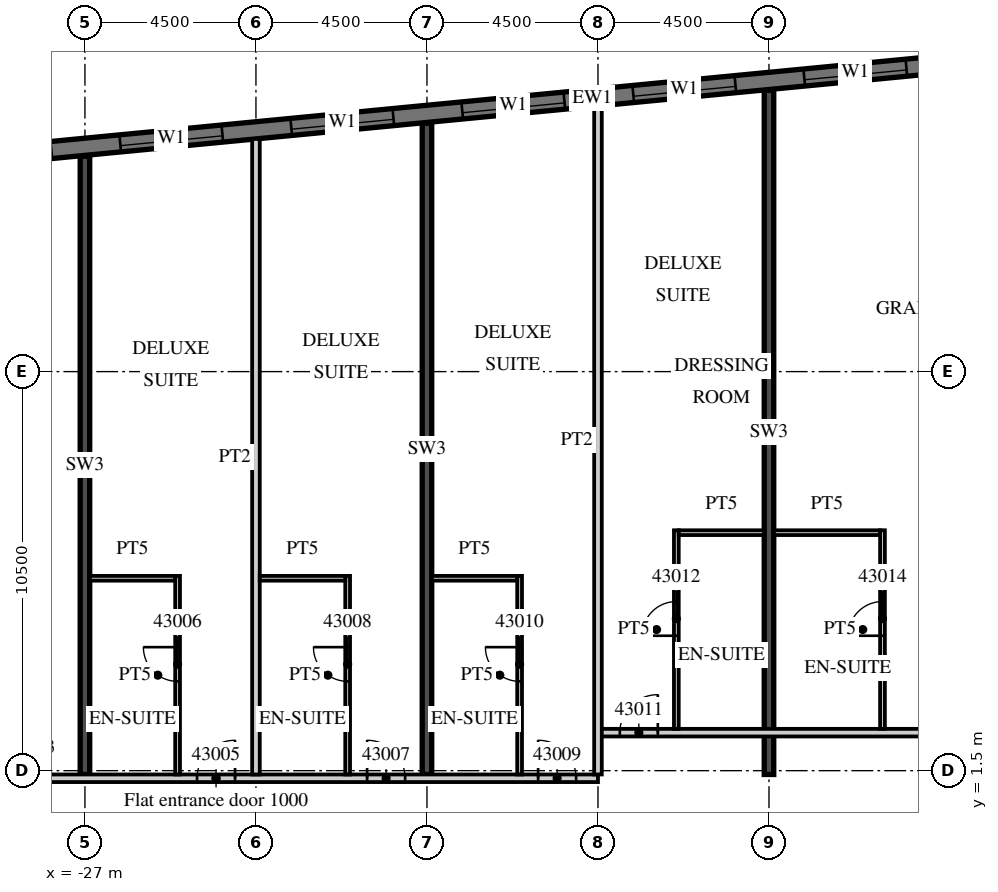
"""IFC4 building model, lengths in metres.
Left out: names, types, materials, properties, quantities, classifications, styles, units other than length and angle.
Written with IfcOpenShell. Run it as: python <this file> out.ifc"""

import sys

from ifc_helpers import new_model, si_unit, direction, frame, frame_2d, origin, place, context, subcontext, project, spatial, rectangle, extrude, element, fill, save


model = new_model("IFC4")
c1 = context("Model", 3, precision=1e-05, world=origin(), true_north=direction((0.0, 1.0)))
c2 = subcontext(c1, "Body", "Model", "MODEL_VIEW")
j1 = project(units=[si_unit("LENGTHUNIT", "METRE"), si_unit("PLANEANGLEUNIT", "RADIAN")], contexts=[c1])
p1 = place(None, origin())
s1 = spatial("IfcSite", under=j1, at=p1, CompositionType="ELEMENT")
p2 = place(p1, origin())
s2 = spatial("IfcBuilding", under=s1, at=p2, CompositionType="ELEMENT")
p3 = place(p2, frame((0.0, 0.0, 183.4)))
s3 = spatial("IfcBuildingStorey", under=s2, at=p3, CompositionType="ELEMENT", Elevation=183.4)
p4 = place(p3, frame((-27.0, 1.4, 0.0), z_axis=(0.0, 0.0, 1.0), x_axis=(0.0, 1.0, 0.0)))
e1 = element("IfcWall", 1, at=p4, inside=s3, PredefinedType="SHEAR", context=c2, shape_type="SweptSolid", body=[
    extrude(rectangle(XDim=16.268, YDim=0.25, at=frame_2d((8.134, 0.0))), origin(), (0.0, 0.0, 1.0), 3.3),
])
p5 = place(p3, frame((-18.0, 1.4, 0.0), z_axis=(0.0, 0.0, 1.0), x_axis=(0.0, 1.0, 0.0)))
e2 = element("IfcWall", 2, at=p5, inside=s3, PredefinedType="SHEAR", context=c2, shape_type="SweptSolid", body=[
    extrude(rectangle(XDim=17.134, YDim=0.25, at=frame_2d((8.567, 0.0))), origin(), (0.0, 0.0, 1.0), 3.3),
])
p6 = place(p3, frame((-9.0, 1.4, 0.0), z_axis=(0.0, 0.0, 1.0), x_axis=(0.0, 1.0, 0.0)))
e3 = element("IfcWall", 3, at=p6, inside=s3, PredefinedType="SHEAR", context=c2, shape_type="SweptSolid", body=[
    extrude(rectangle(XDim=18.001, YDim=0.25, at=frame_2d((9.0, 0.0))), origin(), (0.0, 0.0, 1.0), 3.3),
])
p7 = place(p3, frame((13.521, 21.817, 0.0), z_axis=(0.0, 0.0, 1.0), x_axis=(-0.995396508751, -0.095842529008, 0.0)))
e4 = element("IfcWall", 4, at=p7, inside=s3, PredefinedType="SOLIDWALL", context=c2, shape_type="SweptSolid", body=[
    extrude(rectangle(XDim=54.591, YDim=0.45, at=frame_2d((27.296, 0.0))), origin(), (0.0, 0.0, 1.0), 3.02),
])
p8 = place(p7, frame((0.91, 0.0, 0.45)))
e5 = element("IfcOpeningElement", 5, at=p8, cuts=e4, PredefinedType="OPENING", context=c2, shape_type="SweptSolid", body=[
    extrude(rectangle(XDim=2.7, YDim=2.25, at=frame_2d((1.35, 1.125))), frame((0.0, 0.235, 0.0), z_axis=(0.0, -1.0, 0.0), x_axis=(1.0, 0.0, 0.0)), (0.0, 0.0, 1.0), 0.47),
])
p9 = place(p7, frame((5.431, 0.0, 0.45)))
e6 = element("IfcOpeningElement", 6, at=p9, cuts=e4, PredefinedType="OPENING", context=c2, shape_type="SweptSolid", body=[
    extrude(rectangle(XDim=2.7, YDim=2.25, at=frame_2d((1.35, 1.125))), frame((0.0, 0.235, 0.0), z_axis=(0.0, -1.0, 0.0), x_axis=(1.0, 0.0, 0.0)), (0.0, 0.0, 1.0), 0.47),
])
p10 = place(p7, frame((9.952, 0.0, 0.45)))
e7 = element("IfcOpeningElement", 7, at=p10, cuts=e4, PredefinedType="OPENING", context=c2, shape_type="SweptSolid", body=[
    extrude(rectangle(XDim=2.7, YDim=2.25, at=frame_2d((1.35, 1.125))), frame((0.0, 0.235, 0.0), z_axis=(0.0, -1.0, 0.0), x_axis=(1.0, 0.0, 0.0)), (0.0, 0.0, 1.0), 0.47),
])
p11 = place(p7, frame((14.473, 0.0, 0.45)))
e8 = element("IfcOpeningElement", 8, at=p11, cuts=e4, PredefinedType="OPENING", context=c2, shape_type="SweptSolid", body=[
    extrude(rectangle(XDim=2.7, YDim=2.25, at=frame_2d((1.35, 1.125))), frame((0.0, 0.235, 0.0), z_axis=(0.0, -1.0, 0.0), x_axis=(1.0, 0.0, 0.0)), (0.0, 0.0, 1.0), 0.47),
])
p12 = place(p7, frame((18.994, 0.0, 0.45)))
e9 = element("IfcOpeningElement", 9, at=p12, cuts=e4, PredefinedType="OPENING", context=c2, shape_type="SweptSolid", body=[
    extrude(rectangle(XDim=2.7, YDim=2.25, at=frame_2d((1.35, 1.125))), frame((0.0, 0.235, 0.0), z_axis=(0.0, -1.0, 0.0), x_axis=(1.0, 0.0, 0.0)), (0.0, 0.0, 1.0), 0.47),
])
p13 = place(p7, frame((23.514, 0.0, 0.45)))
e10 = element("IfcOpeningElement", 10, at=p13, cuts=e4, PredefinedType="OPENING", context=c2, shape_type="SweptSolid", body=[
    extrude(rectangle(XDim=2.7, YDim=2.25, at=frame_2d((1.35, 1.125))), frame((0.0, 0.235, 0.0), z_axis=(0.0, -1.0, 0.0), x_axis=(1.0, 0.0, 0.0)), (0.0, 0.0, 1.0), 0.47),
])
p14 = place(p7, frame((28.035, 0.0, 0.45)))
e11 = element("IfcOpeningElement", 11, at=p14, cuts=e4, PredefinedType="OPENING", context=c2, shape_type="SweptSolid", body=[
    extrude(rectangle(XDim=2.7, YDim=2.25, at=frame_2d((1.35, 1.125))), frame((0.0, 0.235, 0.0), z_axis=(0.0, -1.0, 0.0), x_axis=(1.0, 0.0, 0.0)), (0.0, 0.0, 1.0), 0.47),
])
p15 = place(p7, frame((32.556, 0.0, 0.45)))
e12 = element("IfcOpeningElement", 12, at=p15, cuts=e4, PredefinedType="OPENING", context=c2, shape_type="SweptSolid", body=[
    extrude(rectangle(XDim=2.7, YDim=2.25, at=frame_2d((1.35, 1.125))), frame((0.0, 0.235, 0.0), z_axis=(0.0, -1.0, 0.0), x_axis=(1.0, 0.0, 0.0)), (0.0, 0.0, 1.0), 0.47),
])
p16 = place(p7, frame((37.077, 0.0, 0.45)))
e13 = element("IfcOpeningElement", 13, at=p16, cuts=e4, PredefinedType="OPENING", context=c2, shape_type="SweptSolid", body=[
    extrude(rectangle(XDim=2.7, YDim=2.25, at=frame_2d((1.35, 1.125))), frame((0.0, 0.235, 0.0), z_axis=(0.0, -1.0, 0.0), x_axis=(1.0, 0.0, 0.0)), (0.0, 0.0, 1.0), 0.47),
])
p17 = place(p7, frame((41.598, 0.0, 0.45)))
e14 = element("IfcOpeningElement", 14, at=p17, cuts=e4, PredefinedType="OPENING", context=c2, shape_type="SweptSolid", body=[
    extrude(rectangle(XDim=2.7, YDim=2.25, at=frame_2d((1.35, 1.125))), frame((0.0, 0.235, 0.0), z_axis=(0.0, -1.0, 0.0), x_axis=(1.0, 0.0, 0.0)), (0.0, 0.0, 1.0), 0.47),
])
p18 = place(p7, frame((46.118, 0.0, 0.45)))
e15 = element("IfcOpeningElement", 15, at=p18, cuts=e4, PredefinedType="OPENING", context=c2, shape_type="SweptSolid", body=[
    extrude(rectangle(XDim=2.7, YDim=2.25, at=frame_2d((1.35, 1.125))), frame((0.0, 0.235, 0.0), z_axis=(0.0, -1.0, 0.0), x_axis=(1.0, 0.0, 0.0)), (0.0, 0.0, 1.0), 0.47),
])
p19 = place(p7, frame((50.629, 0.0, 0.45)))
e16 = element("IfcOpeningElement", 16, at=p19, cuts=e4, PredefinedType="OPENING", context=c2, shape_type="SweptSolid", body=[
    extrude(rectangle(XDim=2.7, YDim=2.25, at=frame_2d((1.35, 1.125))), frame((0.0, 0.235, 0.0), z_axis=(0.0, -1.0, 0.0), x_axis=(1.0, 0.0, 0.0)), (0.0, 0.0, 1.0), 0.47),
])
p20 = place(p3, frame((-42.913, 1.3, 0.0), z_axis=(0.0, 0.0, 1.0), x_axis=(1.0, 0.0, 0.0)))
e17 = element("IfcWall", 17, at=p20, inside=s3, PredefinedType="PARTITIONING", context=c2, shape_type="SweptSolid", body=[
    extrude(rectangle(XDim=29.413, YDim=0.2, at=frame_2d((14.707, 0.0))), origin(), (0.0, 0.0, 1.0), 3.02),
])
p21 = place(p20, frame((1.406, 0.0, 0.0)))
e18 = element("IfcOpeningElement", 18, at=p21, cuts=e17, PredefinedType="OPENING", context=c2, shape_type="SweptSolid", body=[
    extrude(rectangle(XDim=1.2, YDim=2.1, at=frame_2d((0.6, 1.05))), frame((0.0, 0.11, 0.0), z_axis=(0.0, -1.0, 0.0), x_axis=(1.0, 0.0, 0.0)), (0.0, 0.0, 1.0), 0.22),
])
p22 = place(p20, frame((12.275, 0.0, 0.0)))
e19 = element("IfcOpeningElement", 19, at=p22, cuts=e17, PredefinedType="OPENING", context=c2, shape_type="SweptSolid", body=[
    extrude(rectangle(XDim=1.2, YDim=2.1, at=frame_2d((0.6, 1.05))), frame((0.0, 0.11, 0.0), z_axis=(0.0, -1.0, 0.0), x_axis=(1.0, 0.0, 0.0)), (0.0, 0.0, 1.0), 0.22),
])
p23 = place(p20, frame((18.863, 0.0, 0.0)))
e20 = element("IfcOpeningElement", 20, at=p23, cuts=e17, PredefinedType="OPENING", context=c2, shape_type="SweptSolid", body=[
    extrude(rectangle(XDim=1.0, YDim=2.1, at=frame_2d((0.5, 1.05))), frame((0.0, 0.11, 0.0), z_axis=(0.0, -1.0, 0.0), x_axis=(1.0, 0.0, 0.0)), (0.0, 0.0, 1.0), 0.22),
])
p24 = place(p20, frame((23.338, 0.0, 0.0)))
e21 = element("IfcOpeningElement", 21, at=p24, cuts=e17, PredefinedType="OPENING", context=c2, shape_type="SweptSolid", body=[
    extrude(rectangle(XDim=1.0, YDim=2.1, at=frame_2d((0.5, 1.05))), frame((0.0, 0.11, 0.0), z_axis=(0.0, -1.0, 0.0), x_axis=(1.0, 0.0, 0.0)), (0.0, 0.0, 1.0), 0.22),
])
p25 = place(p20, frame((27.838, 0.0, 0.0)))
e22 = element("IfcOpeningElement", 22, at=p25, cuts=e17, PredefinedType="OPENING", context=c2, shape_type="SweptSolid", body=[
    extrude(rectangle(XDim=1.0, YDim=2.1, at=frame_2d((0.5, 1.05))), frame((0.0, 0.11, 0.0), z_axis=(0.0, -1.0, 0.0), x_axis=(1.0, 0.0, 0.0)), (0.0, 0.0, 1.0), 0.22),
])
p26 = place(p3, frame((-13.5, 2.5, 0.0), z_axis=(0.0, 0.0, 1.0), x_axis=(1.0, 0.0, 0.0)))
e23 = element("IfcWall", 23, at=p26, inside=s3, PredefinedType="PARTITIONING", context=c2, shape_type="SweptSolid", body=[
    extrude(rectangle(XDim=27.0, YDim=0.2, at=frame_2d((13.5, 0.0))), origin(), (0.0, 0.0, 1.0), 3.02),
])
p27 = place(p26, frame((0.575, 0.0, 0.0)))
e24 = element("IfcOpeningElement", 24, at=p27, cuts=e23, PredefinedType="OPENING", context=c2, shape_type="SweptSolid", body=[
    extrude(rectangle(XDim=1.0, YDim=2.1, at=frame_2d((0.5, 1.05))), frame((0.0, 0.11, 0.0), z_axis=(0.0, -1.0, 0.0), x_axis=(1.0, 0.0, 0.0)), (0.0, 0.0, 1.0), 0.22),
])
p28 = place(p26, frame((9.863, 0.0, 0.0)))
e25 = element("IfcOpeningElement", 25, at=p28, cuts=e23, PredefinedType="OPENING", context=c2, shape_type="SweptSolid", body=[
    extrude(rectangle(XDim=1.2, YDim=2.1, at=frame_2d((0.6, 1.05))), frame((0.0, 0.11, 0.0), z_axis=(0.0, -1.0, 0.0), x_axis=(1.0, 0.0, 0.0)), (0.0, 0.0, 1.0), 0.22),
])
p29 = place(p26, frame((15.938, 0.0, 0.0)))
e26 = element("IfcOpeningElement", 26, at=p29, cuts=e23, PredefinedType="OPENING", context=c2, shape_type="SweptSolid", body=[
    extrude(rectangle(XDim=1.2, YDim=2.1, at=frame_2d((0.6, 1.05))), frame((0.0, 0.11, 0.0), z_axis=(0.0, -1.0, 0.0), x_axis=(1.0, 0.0, 0.0)), (0.0, 0.0, 1.0), 0.22),
])
p30 = place(p26, frame((25.425, 0.0, 0.0)))
e27 = element("IfcOpeningElement", 27, at=p30, cuts=e23, PredefinedType="OPENING", context=c2, shape_type="SweptSolid", body=[
    extrude(rectangle(XDim=1.0, YDim=2.1, at=frame_2d((0.5, 1.05))), frame((0.0, 0.11, 0.0), z_axis=(0.0, -1.0, 0.0), x_axis=(1.0, 0.0, 0.0)), (0.0, 0.0, 1.0), 0.22),
])
p31 = place(p3, frame((-22.5, 1.4, 0.0), z_axis=(0.0, 0.0, 1.0), x_axis=(0.0, 1.0, 0.0)))
e28 = element("IfcWall", 28, at=p31, inside=s3, PredefinedType="PARTITIONING", context=c2, shape_type="SweptSolid", body=[
    extrude(rectangle(XDim=16.723, YDim=0.2, at=frame_2d((8.362, 0.0))), origin(), (0.0, 0.0, 1.0), 3.02),
])
p32 = place(p3, frame((-24.562, 1.4, 0.0), z_axis=(0.0, 0.0, 1.0), x_axis=(0.0, 1.0, 0.0)))
e29 = element("IfcWall", 29, at=p32, inside=s3, PredefinedType="PARTITIONING", context=c2, shape_type="SweptSolid", body=[
    extrude(rectangle(XDim=5.225, YDim=0.125, at=frame_2d((2.613, 0.0))), origin(), (0.0, 0.0, 1.0), 3.02),
])
p33 = place(p32, frame((2.45, 0.0, 0.0)))
e30 = element("IfcOpeningElement", 30, at=p33, cuts=e29, PredefinedType="OPENING", context=c2, shape_type="SweptSolid", body=[
    extrude(rectangle(XDim=0.9, YDim=2.1, at=frame_2d((0.45, 1.05))), frame((0.0, 0.073, 0.0), z_axis=(0.0, -1.0, 0.0), x_axis=(1.0, 0.0, 0.0)), (0.0, 0.0, 1.0), 0.145),
])
p34 = place(p3, frame((-26.875, 6.562, 0.0), z_axis=(0.0, 0.0, 1.0), x_axis=(1.0, 0.0, 0.0)))
e31 = element("IfcWall", 31, at=p34, inside=s3, PredefinedType="PARTITIONING", context=c2, shape_type="SweptSolid", body=[
    extrude(rectangle(XDim=2.25, YDim=0.125, at=frame_2d((1.125, 0.0))), origin(), (0.0, 0.0, 1.0), 3.02),
])
p35 = place(p3, frame((-20.087, 1.4, 0.0), z_axis=(0.0, 0.0, 1.0), x_axis=(0.0, 1.0, 0.0)))
e32 = element("IfcWall", 32, at=p35, inside=s3, PredefinedType="PARTITIONING", context=c2, shape_type="SweptSolid", body=[
    extrude(rectangle(XDim=5.225, YDim=0.125, at=frame_2d((2.613, 0.0))), origin(), (0.0, 0.0, 1.0), 3.02),
])
p36 = place(p35, frame((2.45, 0.0, 0.0)))
e33 = element("IfcOpeningElement", 33, at=p36, cuts=e32, PredefinedType="OPENING", context=c2, shape_type="SweptSolid", body=[
    extrude(rectangle(XDim=0.9, YDim=2.1, at=frame_2d((0.45, 1.05))), frame((0.0, 0.073, 0.0), z_axis=(0.0, -1.0, 0.0), x_axis=(1.0, 0.0, 0.0)), (0.0, 0.0, 1.0), 0.145),
])
p37 = place(p3, frame((-22.4, 6.562, 0.0), z_axis=(0.0, 0.0, 1.0), x_axis=(1.0, 0.0, 0.0)))
e34 = element("IfcWall", 34, at=p37, inside=s3, PredefinedType="PARTITIONING", context=c2, shape_type="SweptSolid", body=[
    extrude(rectangle(XDim=2.25, YDim=0.125, at=frame_2d((1.125, 0.0))), origin(), (0.0, 0.0, 1.0), 3.02),
])
p38 = place(p3, frame((-13.5, 1.4, 0.0), z_axis=(0.0, 0.0, 1.0), x_axis=(0.0, 1.0, 0.0)))
e35 = element("IfcWall", 35, at=p38, inside=s3, PredefinedType="PARTITIONING", context=c2, shape_type="SweptSolid", body=[
    extrude(rectangle(XDim=17.59, YDim=0.2, at=frame_2d((8.795, 0.0))), origin(), (0.0, 0.0, 1.0), 3.02),
])
p39 = place(p3, frame((-15.562, 1.4, 0.0), z_axis=(0.0, 0.0, 1.0), x_axis=(0.0, 1.0, 0.0)))
e36 = element("IfcWall", 36, at=p39, inside=s3, PredefinedType="PARTITIONING", context=c2, shape_type="SweptSolid", body=[
    extrude(rectangle(XDim=5.225, YDim=0.125, at=frame_2d((2.613, 0.0))), origin(), (0.0, 0.0, 1.0), 3.02),
])
p40 = place(p39, frame((2.45, 0.0, 0.0)))
e37 = element("IfcOpeningElement", 37, at=p40, cuts=e36, PredefinedType="OPENING", context=c2, shape_type="SweptSolid", body=[
    extrude(rectangle(XDim=0.9, YDim=2.1, at=frame_2d((0.45, 1.05))), frame((0.0, 0.073, 0.0), z_axis=(0.0, -1.0, 0.0), x_axis=(1.0, 0.0, 0.0)), (0.0, 0.0, 1.0), 0.145),
])
p41 = place(p3, frame((-17.875, 6.562, 0.0), z_axis=(0.0, 0.0, 1.0), x_axis=(1.0, 0.0, 0.0)))
e38 = element("IfcWall", 38, at=p41, inside=s3, PredefinedType="PARTITIONING", context=c2, shape_type="SweptSolid", body=[
    extrude(rectangle(XDim=2.25, YDim=0.125, at=frame_2d((1.125, 0.0))), origin(), (0.0, 0.0, 1.0), 3.02),
])
p42 = place(p3, frame((-11.438, 2.6, 0.0), z_axis=(0.0, 0.0, 1.0), x_axis=(0.0, 1.0, 0.0)))
e39 = element("IfcWall", 39, at=p42, inside=s3, PredefinedType="PARTITIONING", context=c2, shape_type="SweptSolid", body=[
    extrude(rectangle(XDim=5.225, YDim=0.125, at=frame_2d((2.612, 0.0))), origin(), (0.0, 0.0, 1.0), 3.02),
])
p43 = place(p42, frame((2.45, 0.0, 0.0)))
e40 = element("IfcOpeningElement", 40, at=p43, cuts=e39, PredefinedType="OPENING", context=c2, shape_type="SweptSolid", body=[
    extrude(rectangle(XDim=0.9, YDim=2.1, at=frame_2d((0.45, 1.05))), frame((0.0, 0.073, 0.0), z_axis=(0.0, -1.0, 0.0), x_axis=(1.0, 0.0, 0.0)), (0.0, 0.0, 1.0), 0.145),
])
p44 = place(p3, frame((-11.375, 7.762, 0.0), z_axis=(0.0, 0.0, 1.0), x_axis=(1.0, 0.0, 0.0)))
e41 = element("IfcWall", 41, at=p44, inside=s3, PredefinedType="PARTITIONING", context=c2, shape_type="SweptSolid", body=[
    extrude(rectangle(XDim=2.25, YDim=0.125, at=frame_2d((1.125, 0.0))), origin(), (0.0, 0.0, 1.0), 3.02),
])
p45 = place(p3, frame((-6.013, 2.6, 0.0), z_axis=(0.0, 0.0, 1.0), x_axis=(0.0, 1.0, 0.0)))
e42 = element("IfcWall", 42, at=p45, inside=s3, PredefinedType="PARTITIONING", context=c2, shape_type="SweptSolid", body=[
    extrude(rectangle(XDim=5.225, YDim=0.125, at=frame_2d((2.612, 0.0))), origin(), (0.0, 0.0, 1.0), 3.02),
])
p46 = place(p45, frame((2.45, 0.0, 0.0)))
e43 = element("IfcOpeningElement", 43, at=p46, cuts=e42, PredefinedType="OPENING", context=c2, shape_type="SweptSolid", body=[
    extrude(rectangle(XDim=0.9, YDim=2.1, at=frame_2d((0.45, 1.05))), frame((0.0, 0.073, 0.0), z_axis=(0.0, -1.0, 0.0), x_axis=(1.0, 0.0, 0.0)), (0.0, 0.0, 1.0), 0.145),
])
p47 = place(p3, frame((-8.875, 7.762, 0.0), z_axis=(0.0, 0.0, 1.0), x_axis=(1.0, 0.0, 0.0)))
e44 = element("IfcWall", 44, at=p47, inside=s3, PredefinedType="PARTITIONING", context=c2, shape_type="SweptSolid", body=[
    extrude(rectangle(XDim=2.8, YDim=0.125, at=frame_2d((1.4, 0.0))), origin(), (0.0, 0.0, 1.0), 3.02),
])
p48 = place(p12, origin())
e45 = element("IfcWindow", 45, at=p48, inside=s3, PartitioningType="SINGLE_PANEL", PredefinedType="WINDOW", context=c2, shape_type="SweptSolid", body=[
    extrude(rectangle(XDim=2.7, YDim=2.25, at=frame_2d((1.35, 1.125))), frame((0.0, 0.09, 0.0), z_axis=(0.0, -1.0, 0.0), x_axis=(1.0, 0.0, 0.0)), (0.0, 0.0, 1.0), 0.06),
])
fill(e9, e45)
p49 = place(p13, origin())
e46 = element("IfcWindow", 46, at=p49, inside=s3, PartitioningType="SINGLE_PANEL", PredefinedType="WINDOW", context=c2, shape_type="SweptSolid", body=[
    extrude(rectangle(XDim=2.7, YDim=2.25, at=frame_2d((1.35, 1.125))), frame((0.0, 0.09, 0.0), z_axis=(0.0, -1.0, 0.0), x_axis=(1.0, 0.0, 0.0)), (0.0, 0.0, 1.0), 0.06),
])
fill(e10, e46)
p50 = place(p14, origin())
e47 = element("IfcWindow", 47, at=p50, inside=s3, PartitioningType="SINGLE_PANEL", PredefinedType="WINDOW", context=c2, shape_type="SweptSolid", body=[
    extrude(rectangle(XDim=2.7, YDim=2.25, at=frame_2d((1.35, 1.125))), frame((0.0, 0.09, 0.0), z_axis=(0.0, -1.0, 0.0), x_axis=(1.0, 0.0, 0.0)), (0.0, 0.0, 1.0), 0.06),
])
fill(e11, e47)
p51 = place(p15, origin())
e48 = element("IfcWindow", 48, at=p51, inside=s3, PartitioningType="SINGLE_PANEL", PredefinedType="WINDOW", context=c2, shape_type="SweptSolid", body=[
    extrude(rectangle(XDim=2.7, YDim=2.25, at=frame_2d((1.35, 1.125))), frame((0.0, 0.09, 0.0), z_axis=(0.0, -1.0, 0.0), x_axis=(1.0, 0.0, 0.0)), (0.0, 0.0, 1.0), 0.06),
])
fill(e12, e48)
p52 = place(p16, origin())
e49 = element("IfcWindow", 49, at=p52, inside=s3, PartitioningType="SINGLE_PANEL", PredefinedType="WINDOW", context=c2, shape_type="SweptSolid", body=[
    extrude(rectangle(XDim=2.7, YDim=2.25, at=frame_2d((1.35, 1.125))), frame((0.0, 0.09, 0.0), z_axis=(0.0, -1.0, 0.0), x_axis=(1.0, 0.0, 0.0)), (0.0, 0.0, 1.0), 0.06),
])
fill(e13, e49)
p53 = place(p23, origin())
e50 = element("IfcDoor", 50, at=p53, inside=s3, OperationType="SINGLE_SWING_RIGHT", PredefinedType="DOOR", context=c2, shape_type="SweptSolid", body=[
    extrude(rectangle(XDim=1.0, YDim=2.1, at=frame_2d((0.5, 1.05))), frame((0.0, 0.025, 0.0), z_axis=(0.0, -1.0, 0.0), x_axis=(1.0, 0.0, 0.0)), (0.0, 0.0, 1.0), 0.05),
])
fill(e20, e50)
p54 = place(p33, origin())
e51 = element("IfcDoor", 51, at=p54, inside=s3, OperationType="SINGLE_SWING_RIGHT", PredefinedType="DOOR", context=c2, shape_type="SweptSolid", body=[
    extrude(rectangle(XDim=0.9, YDim=2.1, at=frame_2d((0.45, 1.05))), frame((0.0, 0.025, 0.0), z_axis=(0.0, -1.0, 0.0), x_axis=(1.0, 0.0, 0.0)), (0.0, 0.0, 1.0), 0.05),
])
fill(e30, e51)
p55 = place(p24, origin())
e52 = element("IfcDoor", 52, at=p55, inside=s3, OperationType="SINGLE_SWING_LEFT", PredefinedType="DOOR", context=c2, shape_type="SweptSolid", body=[
    extrude(rectangle(XDim=1.0, YDim=2.1, at=frame_2d((0.5, 1.05))), frame((0.0, 0.025, 0.0), z_axis=(0.0, -1.0, 0.0), x_axis=(1.0, 0.0, 0.0)), (0.0, 0.0, 1.0), 0.05),
])
fill(e21, e52)
p56 = place(p36, origin())
e53 = element("IfcDoor", 53, at=p56, inside=s3, OperationType="SINGLE_SWING_RIGHT", PredefinedType="DOOR", context=c2, shape_type="SweptSolid", body=[
    extrude(rectangle(XDim=0.9, YDim=2.1, at=frame_2d((0.45, 1.05))), frame((0.0, 0.025, 0.0), z_axis=(0.0, -1.0, 0.0), x_axis=(1.0, 0.0, 0.0)), (0.0, 0.0, 1.0), 0.05),
])
fill(e33, e53)
p57 = place(p25, origin())
e54 = element("IfcDoor", 54, at=p57, inside=s3, OperationType="SINGLE_SWING_LEFT", PredefinedType="DOOR", context=c2, shape_type="SweptSolid", body=[
    extrude(rectangle(XDim=1.0, YDim=2.1, at=frame_2d((0.5, 1.05))), frame((0.0, 0.025, 0.0), z_axis=(0.0, -1.0, 0.0), x_axis=(1.0, 0.0, 0.0)), (0.0, 0.0, 1.0), 0.05),
])
fill(e22, e54)
p58 = place(p40, origin())
e55 = element("IfcDoor", 55, at=p58, inside=s3, OperationType="SINGLE_SWING_RIGHT", PredefinedType="DOOR", context=c2, shape_type="SweptSolid", body=[
    extrude(rectangle(XDim=0.9, YDim=2.1, at=frame_2d((0.45, 1.05))), frame((0.0, 0.025, 0.0), z_axis=(0.0, -1.0, 0.0), x_axis=(1.0, 0.0, 0.0)), (0.0, 0.0, 1.0), 0.05),
])
fill(e37, e55)
p59 = place(p27, origin())
e56 = element("IfcDoor", 56, at=p59, inside=s3, OperationType="SINGLE_SWING_RIGHT", PredefinedType="DOOR", context=c2, shape_type="SweptSolid", body=[
    extrude(rectangle(XDim=1.0, YDim=2.1, at=frame_2d((0.5, 1.05))), frame((0.0, 0.025, 0.0), z_axis=(0.0, -1.0, 0.0), x_axis=(1.0, 0.0, 0.0)), (0.0, 0.0, 1.0), 0.05),
])
fill(e24, e56)
p60 = place(p43, origin())
e57 = element("IfcDoor", 57, at=p60, inside=s3, OperationType="SINGLE_SWING_LEFT", PredefinedType="DOOR", context=c2, shape_type="SweptSolid", body=[
    extrude(rectangle(XDim=0.9, YDim=2.1, at=frame_2d((0.45, 1.05))), frame((0.0, 0.025, 0.0), z_axis=(0.0, -1.0, 0.0), x_axis=(1.0, 0.0, 0.0)), (0.0, 0.0, 1.0), 0.05),
])
fill(e40, e57)
p61 = place(p46, origin())
e58 = element("IfcDoor", 58, at=p61, inside=s3, OperationType="SINGLE_SWING_LEFT", PredefinedType="DOOR", context=c2, shape_type="SweptSolid", body=[
    extrude(rectangle(XDim=0.9, YDim=2.1, at=frame_2d((0.45, 1.05))), frame((0.0, 0.025, 0.0), z_axis=(0.0, -1.0, 0.0), x_axis=(1.0, 0.0, 0.0)), (0.0, 0.0, 1.0), 0.05),
])
fill(e43, e58)
save(model, sys.argv[1])
